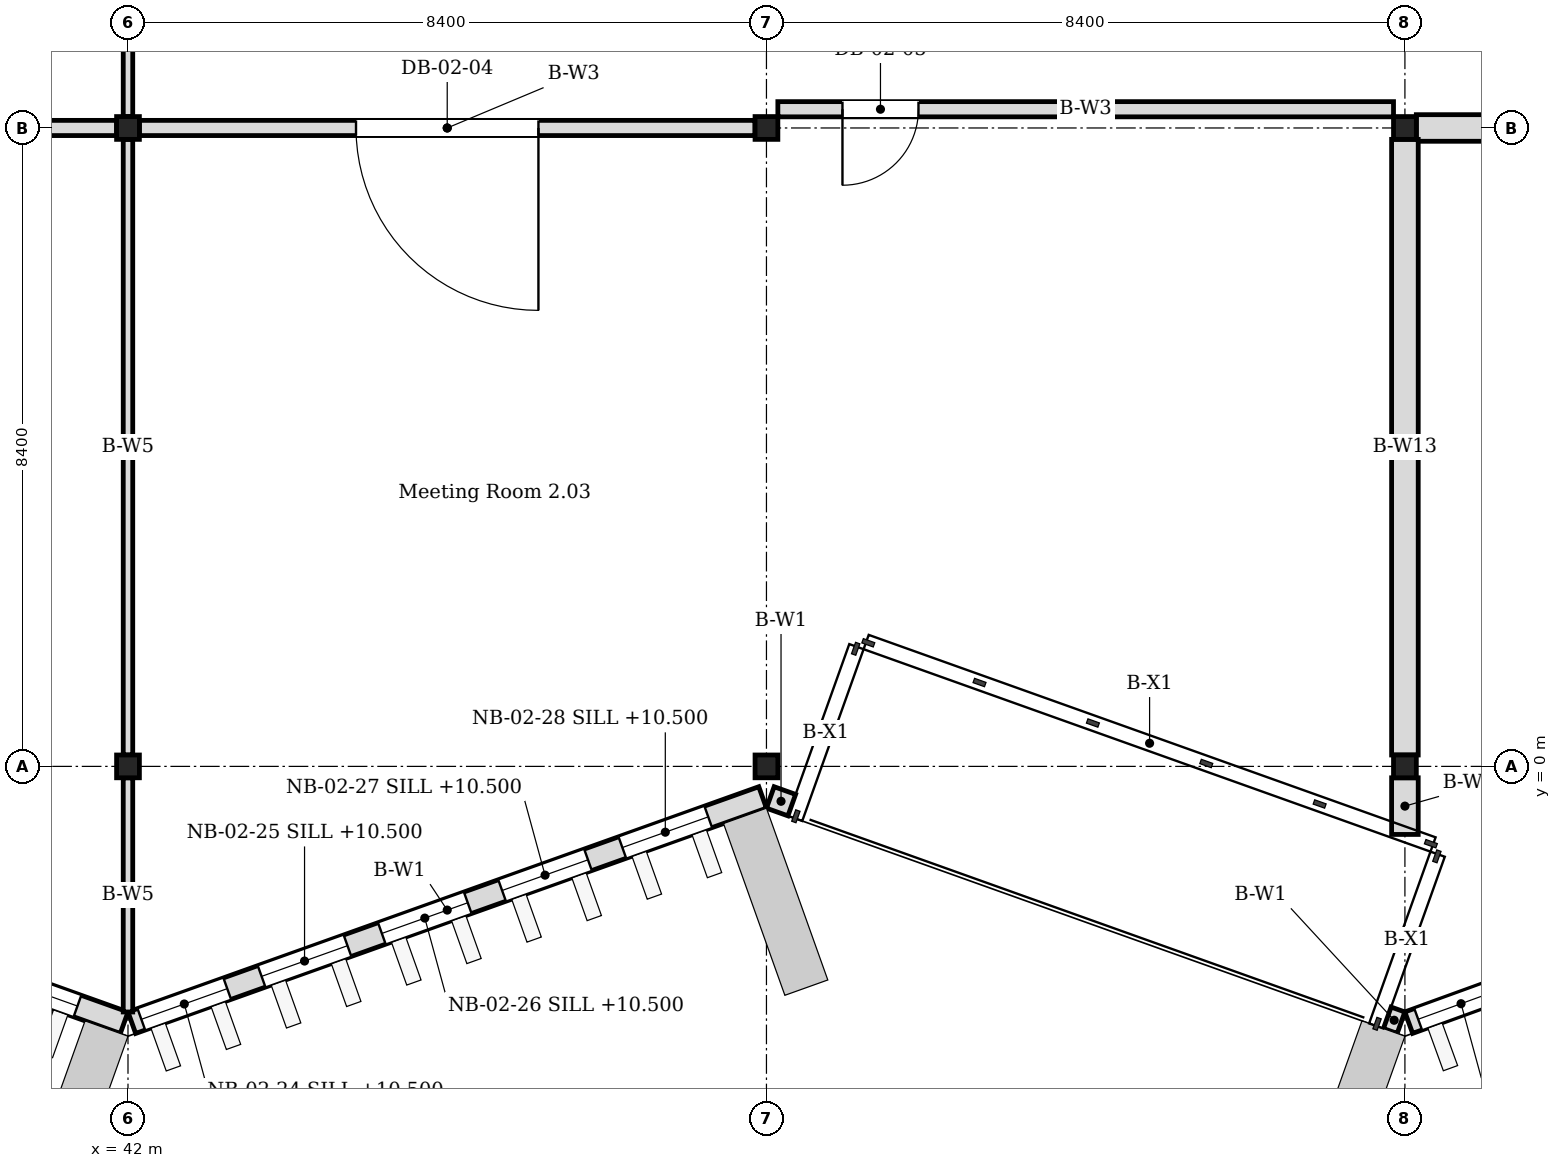
"""IFC4 building model, lengths in metres.
Left out: names, types, materials, properties, quantities, classifications, styles, units other than length and angle.
Written with IfcOpenShell. Run it as: python <this file> out.ifc"""

import sys

from ifc_helpers import new_model, si_unit, direction, frame, frame_2d, origin, origin_2d, place, context, subcontext, project, spatial, rectangle, i_section, extrude, element, fill, save


model = new_model("IFC4")
c1 = context("Model", 3, precision=1e-05, world=origin(), true_north=direction((0.0, 1.0)))
c2 = subcontext(c1, "Body", "Model", "MODEL_VIEW")
j1 = project(units=[si_unit("LENGTHUNIT", "METRE"), si_unit("PLANEANGLEUNIT", "RADIAN")], contexts=[c1])
p1 = place(None, origin())
s1 = spatial("IfcSite", under=j1, at=p1, CompositionType="ELEMENT")
p2 = place(p1, origin())
s2 = spatial("IfcBuilding", under=s1, at=p2, CompositionType="ELEMENT")
p3 = place(p2, frame((0.0, 0.0, 10.2)))
s3 = spatial("IfcBuildingStorey", under=s2, at=p3, CompositionType="ELEMENT", Elevation=10.2)
for number, where, z_axis, x_axis in (
    (1, (42.0, 0.0, 0.0), (0.0, 0.0, 1.0), (1.0, 0.0, 0.0)),
    (2, (42.0, 8.4, 0.0), (0.0, 0.0, 1.0), (1.0, 0.0, 0.0)),
    (3, (50.4, 0.0, 0.0), (0.0, 0.0, 1.0), (1.0, 0.0, 0.0)),
    (4, (50.4, 8.4, 0.0), (0.0, 0.0, 1.0), (1.0, 0.0, 0.0)),
    (5, (58.8, 0.0, 0.0), (0.0, 0.0, 1.0), (1.0, 0.0, 0.0)),
    (6, (58.8, 8.4, 0.0), (0.0, 0.0, 1.0), (1.0, 0.0, 0.0)),
):
    element("IfcColumn", number, at=place(p3, frame(where, z_axis=z_axis, x_axis=x_axis)), inside=s3, PredefinedType="COLUMN", context=c2, shape_type="SweptSolid", body=[
        extrude(i_section(OverallWidth=0.3, OverallDepth=0.3, WebThickness=0.01, FlangeThickness=0.015, FilletRadius=0.013, at=origin_2d()), origin(), (0.0, 0.0, 1.0), 4.2),
    ])
p4 = place(p3, frame((33.65, -0.409, 0.0), z_axis=(0.0, 0.0, 1.0), x_axis=(0.941736270411, -0.336352191894, 0.0)))
e7 = element("IfcWall", 7, at=p4, inside=s3, PredefinedType="SOLIDWALL", context=c2, shape_type="SweptSolid", body=[
    extrude(rectangle(XDim=8.812, YDim=0.3, at=frame_2d((4.406, 0.0))), origin(), (0.0, 0.0, 1.0), 4.05),
])
p5 = place(p4, frame((0.24, 0.0, 0.3)))
e8 = element("IfcOpeningElement", 8, at=p5, cuts=e7, PredefinedType="OPENING", context=c2, shape_type="SweptSolid", body=[
    extrude(rectangle(XDim=1.2, YDim=3.3, at=frame_2d((0.6, 1.65))), frame((0.0, 0.16, 0.0), z_axis=(0.0, -1.0, 0.0), x_axis=(1.0, 0.0, 0.0)), (0.0, 0.0, 1.0), 0.32),
])
p6 = place(p4, frame((1.92, 0.0, 0.3)))
e9 = element("IfcOpeningElement", 9, at=p6, cuts=e7, PredefinedType="OPENING", context=c2, shape_type="SweptSolid", body=[
    extrude(rectangle(XDim=1.2, YDim=3.3, at=frame_2d((0.6, 1.65))), frame((0.0, 0.16, 0.0), z_axis=(0.0, -1.0, 0.0), x_axis=(1.0, 0.0, 0.0)), (0.0, 0.0, 1.0), 0.32),
])
p7 = place(p4, frame((3.6, 0.0, 0.3)))
e10 = element("IfcOpeningElement", 10, at=p7, cuts=e7, PredefinedType="OPENING", context=c2, shape_type="SweptSolid", body=[
    extrude(rectangle(XDim=1.2, YDim=3.3, at=frame_2d((0.6, 1.65))), frame((0.0, 0.16, 0.0), z_axis=(0.0, -1.0, 0.0), x_axis=(1.0, 0.0, 0.0)), (0.0, 0.0, 1.0), 0.32),
])
p8 = place(p4, frame((5.28, 0.0, 0.3)))
e11 = element("IfcOpeningElement", 11, at=p8, cuts=e7, PredefinedType="OPENING", context=c2, shape_type="SweptSolid", body=[
    extrude(rectangle(XDim=1.2, YDim=3.3, at=frame_2d((0.6, 1.65))), frame((0.0, 0.16, 0.0), z_axis=(0.0, -1.0, 0.0), x_axis=(1.0, 0.0, 0.0)), (0.0, 0.0, 1.0), 0.32),
])
p9 = place(p4, frame((6.96, 0.0, 0.3)))
e12 = element("IfcOpeningElement", 12, at=p9, cuts=e7, PredefinedType="OPENING", context=c2, shape_type="SweptSolid", body=[
    extrude(rectangle(XDim=1.2, YDim=3.3, at=frame_2d((0.6, 1.65))), frame((0.0, 0.16, 0.0), z_axis=(0.0, -1.0, 0.0), x_axis=(1.0, 0.0, 0.0)), (0.0, 0.0, 1.0), 0.32),
])
p10 = place(p3, frame((42.051, -3.373, 0.0), z_axis=(0.0, 0.0, 1.0), x_axis=(0.941736270411, 0.336352191894, 0.0)))
e13 = element("IfcWall", 13, at=p10, inside=s3, PredefinedType="SOLIDWALL", context=c2, shape_type="SweptSolid", body=[
    extrude(rectangle(XDim=8.812, YDim=0.3, at=frame_2d((4.406, 0.0))), origin(), (0.0, 0.0, 1.0), 4.05),
])
p11 = place(p10, frame((0.133, 0.0, 0.3)))
e14 = element("IfcOpeningElement", 14, at=p11, cuts=e13, PredefinedType="OPENING", context=c2, shape_type="SweptSolid", body=[
    extrude(rectangle(XDim=1.2, YDim=3.3, at=frame_2d((0.6, 1.65))), frame((0.0, 0.16, 0.0), z_axis=(0.0, -1.0, 0.0), x_axis=(1.0, 0.0, 0.0)), (0.0, 0.0, 1.0), 0.32),
])
p12 = place(p10, frame((1.813, 0.0, 0.3)))
e15 = element("IfcOpeningElement", 15, at=p12, cuts=e13, PredefinedType="OPENING", context=c2, shape_type="SweptSolid", body=[
    extrude(rectangle(XDim=1.2, YDim=3.3, at=frame_2d((0.6, 1.65))), frame((0.0, 0.16, 0.0), z_axis=(0.0, -1.0, 0.0), x_axis=(1.0, 0.0, 0.0)), (0.0, 0.0, 1.0), 0.32),
])
p13 = place(p10, frame((3.493, 0.0, 0.3)))
e16 = element("IfcOpeningElement", 16, at=p13, cuts=e13, PredefinedType="OPENING", context=c2, shape_type="SweptSolid", body=[
    extrude(rectangle(XDim=1.2, YDim=3.3, at=frame_2d((0.6, 1.65))), frame((0.0, 0.16, 0.0), z_axis=(0.0, -1.0, 0.0), x_axis=(1.0, 0.0, 0.0)), (0.0, 0.0, 1.0), 0.32),
])
p14 = place(p10, frame((5.173, 0.0, 0.3)))
e17 = element("IfcOpeningElement", 17, at=p14, cuts=e13, PredefinedType="OPENING", context=c2, shape_type="SweptSolid", body=[
    extrude(rectangle(XDim=1.2, YDim=3.3, at=frame_2d((0.6, 1.65))), frame((0.0, 0.16, 0.0), z_axis=(0.0, -1.0, 0.0), x_axis=(1.0, 0.0, 0.0)), (0.0, 0.0, 1.0), 0.32),
])
p15 = place(p10, frame((6.853, 0.0, 0.3)))
e18 = element("IfcOpeningElement", 18, at=p15, cuts=e13, PredefinedType="OPENING", context=c2, shape_type="SweptSolid", body=[
    extrude(rectangle(XDim=1.2, YDim=3.3, at=frame_2d((0.6, 1.65))), frame((0.0, 0.16, 0.0), z_axis=(0.0, -1.0, 0.0), x_axis=(1.0, 0.0, 0.0)), (0.0, 0.0, 1.0), 0.32),
])
p16 = place(p3, frame((50.45, -0.409, 0.0), z_axis=(0.0, 0.0, 1.0), x_axis=(0.941797147708, -0.336181695768, 0.0)))
e19 = element("IfcWall", 19, at=p16, inside=s3, PredefinedType="SOLIDWALL", context=c2, shape_type="SweptSolid", body=[
    extrude(rectangle(XDim=0.3, YDim=0.3, at=frame_2d((0.15, 0.0))), origin(), (0.0, 0.0, 1.0), 4.05),
])
p17 = place(p3, frame((58.568, -3.308, 0.0), z_axis=(0.0, 0.0, 1.0), x_axis=(0.942000485661, -0.335611509061, 0.0)))
e20 = element("IfcWall", 20, at=p17, inside=s3, PredefinedType="SOLIDWALL", context=c2, shape_type="SweptSolid", body=[
    extrude(rectangle(XDim=0.192, YDim=0.3, at=frame_2d((0.096, 0.0))), origin(), (0.0, 0.0, 1.0), 4.05),
])
p18 = place(p3, frame((58.85, -3.372, 0.0), z_axis=(0.0, 0.0, 1.0), x_axis=(0.939953187971, 0.341303390584, 0.0)))
e21 = element("IfcWall", 21, at=p18, inside=s3, PredefinedType="SOLIDWALL", context=c2, shape_type="SweptSolid", body=[
    extrude(rectangle(XDim=8.828, YDim=0.3, at=frame_2d((4.414, 0.0))), origin(), (0.0, 0.0, 1.0), 4.05),
])
p19 = place(p18, frame((0.132, 0.0, 0.3)))
e22 = element("IfcOpeningElement", 22, at=p19, cuts=e21, PredefinedType="OPENING", context=c2, shape_type="SweptSolid", body=[
    extrude(rectangle(XDim=1.2, YDim=3.3, at=frame_2d((0.6, 1.65))), frame((0.0, 0.16, 0.0), z_axis=(0.0, -1.0, 0.0), x_axis=(1.0, 0.0, 0.0)), (0.0, 0.0, 1.0), 0.32),
])
p20 = place(p18, frame((1.812, 0.0, 0.3)))
e23 = element("IfcOpeningElement", 23, at=p20, cuts=e21, PredefinedType="OPENING", context=c2, shape_type="SweptSolid", body=[
    extrude(rectangle(XDim=1.2, YDim=3.3, at=frame_2d((0.6, 1.65))), frame((0.0, 0.16, 0.0), z_axis=(0.0, -1.0, 0.0), x_axis=(1.0, 0.0, 0.0)), (0.0, 0.0, 1.0), 0.32),
])
p21 = place(p18, frame((3.492, 0.0, 0.3)))
e24 = element("IfcOpeningElement", 24, at=p21, cuts=e21, PredefinedType="OPENING", context=c2, shape_type="SweptSolid", body=[
    extrude(rectangle(XDim=1.2, YDim=3.3, at=frame_2d((0.6, 1.65))), frame((0.0, 0.16, 0.0), z_axis=(0.0, -1.0, 0.0), x_axis=(1.0, 0.0, 0.0)), (0.0, 0.0, 1.0), 0.32),
])
p22 = place(p18, frame((5.172, 0.0, 0.3)))
e25 = element("IfcOpeningElement", 25, at=p22, cuts=e21, PredefinedType="OPENING", context=c2, shape_type="SweptSolid", body=[
    extrude(rectangle(XDim=1.2, YDim=3.3, at=frame_2d((0.6, 1.65))), frame((0.0, 0.16, 0.0), z_axis=(0.0, -1.0, 0.0), x_axis=(1.0, 0.0, 0.0)), (0.0, 0.0, 1.0), 0.32),
])
p23 = place(p18, frame((6.852, 0.0, 0.3)))
e26 = element("IfcOpeningElement", 26, at=p23, cuts=e21, PredefinedType="OPENING", context=c2, shape_type="SweptSolid", body=[
    extrude(rectangle(XDim=1.2, YDim=3.3, at=frame_2d((0.6, 1.65))), frame((0.0, 0.16, 0.0), z_axis=(0.0, -1.0, 0.0), x_axis=(1.0, 0.0, 0.0)), (0.0, 0.0, 1.0), 0.32),
])
p24 = place(p3, frame((33.75, 8.4, 0.0), z_axis=(0.0, 0.0, 1.0), x_axis=(1.0, 0.0, 0.0)))
e27 = element("IfcWall", 27, at=p24, inside=s3, PredefinedType="PARTITIONING", context=c2, shape_type="SweptSolid", body=[
    extrude(rectangle(XDim=8.1, YDim=0.2, at=frame_2d((4.05, 0.0))), origin(), (0.0, 0.0, 1.0), 3.35),
])
p25 = place(p24, frame((3.15, 0.0, 0.0)))
e28 = element("IfcOpeningElement", 28, at=p25, cuts=e27, PredefinedType="OPENING", context=c2, shape_type="SweptSolid", body=[
    extrude(rectangle(XDim=1.8, YDim=2.1, at=frame_2d((0.9, 1.05))), frame((0.0, 0.11, 0.0), z_axis=(0.0, -1.0, 0.0), x_axis=(1.0, 0.0, 0.0)), (0.0, 0.0, 1.0), 0.22),
])
p26 = place(p3, frame((42.15, 8.4, 0.0), z_axis=(0.0, 0.0, 1.0), x_axis=(1.0, 0.0, 0.0)))
e29 = element("IfcWall", 29, at=p26, inside=s3, PredefinedType="PARTITIONING", context=c2, shape_type="SweptSolid", body=[
    extrude(rectangle(XDim=8.1, YDim=0.2, at=frame_2d((4.05, 0.0))), origin(), (0.0, 0.0, 1.0), 3.35),
])
p27 = place(p26, frame((2.85, 0.0, 0.0)))
e30 = element("IfcOpeningElement", 30, at=p27, cuts=e29, PredefinedType="OPENING", context=c2, shape_type="SweptSolid", body=[
    extrude(rectangle(XDim=2.4, YDim=2.2, at=frame_2d((1.2, 1.1))), frame((0.0, 0.11, 0.0), z_axis=(0.0, -1.0, 0.0), x_axis=(1.0, 0.0, 0.0)), (0.0, 0.0, 1.0), 0.22),
])
p28 = place(p3, frame((50.55, 8.646, 0.0), z_axis=(0.0, 0.0, 1.0), x_axis=(1.0, 0.0, 0.0)))
e31 = element("IfcWall", 31, at=p28, inside=s3, PredefinedType="PARTITIONING", context=c2, shape_type="SweptSolid", body=[
    extrude(rectangle(XDim=8.1, YDim=0.2, at=frame_2d((4.05, 0.0))), origin(), (0.0, 0.0, 1.0), 3.35),
])
p29 = place(p28, frame((0.85, 0.0, 0.0)))
e32 = element("IfcOpeningElement", 32, at=p29, cuts=e31, PredefinedType="OPENING", context=c2, shape_type="SweptSolid", body=[
    extrude(rectangle(XDim=1.0, YDim=2.1, at=frame_2d((0.5, 1.05))), frame((0.0, 0.11, 0.0), z_axis=(0.0, -1.0, 0.0), x_axis=(1.0, 0.0, 0.0)), (0.0, 0.0, 1.0), 0.22),
])
p30 = place(p3, frame((58.95, 8.4, 0.0), z_axis=(0.0, 0.0, 1.0), x_axis=(1.0, 0.0, 0.0)))
e33 = element("IfcWall", 33, at=p30, inside=s3, PredefinedType="PARTITIONING", context=c2, shape_type="SweptSolid", body=[
    extrude(rectangle(XDim=8.1, YDim=0.35, at=frame_2d((4.05, 0.0))), origin(), (0.0, 0.0, 1.0), 3.35),
])
p31 = place(p30, frame((3.5, 0.0, 0.0)))
e34 = element("IfcOpeningElement", 34, at=p31, cuts=e33, PredefinedType="OPENING", context=c2, shape_type="SweptSolid", body=[
    extrude(rectangle(XDim=1.1, YDim=2.4, at=frame_2d((0.55, 1.2))), frame((0.0, 0.185, 0.0), z_axis=(0.0, -1.0, 0.0), x_axis=(1.0, 0.0, 0.0)), (0.0, 0.0, 1.0), 0.37),
])
p32 = place(p3, frame((42.0, -3.231, 0.0), z_axis=(0.0, 0.0, 1.0), x_axis=(0.0, 1.0, 0.0)))
e35 = element("IfcWall", 35, at=p32, inside=s3, PredefinedType="MOVABLE", context=c2, shape_type="SweptSolid", body=[
    extrude(rectangle(XDim=3.082, YDim=0.125, at=frame_2d((1.541, 0.0))), origin(), (0.0, 0.0, 1.0), 3.35),
])
p33 = place(p3, frame((42.0, 0.15, 0.0), z_axis=(0.0, 0.0, 1.0), x_axis=(0.0, 1.0, 0.0)))
e36 = element("IfcWall", 36, at=p33, inside=s3, PredefinedType="MOVABLE", context=c2, shape_type="SweptSolid", body=[
    extrude(rectangle(XDim=8.1, YDim=0.125, at=frame_2d((4.05, 0.0))), origin(), (0.0, 0.0, 1.0), 3.35),
])
p34 = place(p3, frame((42.0, 8.55, 0.0), z_axis=(0.0, 0.0, 1.0), x_axis=(0.0, 1.0, 0.0)))
e37 = element("IfcWall", 37, at=p34, inside=s3, PredefinedType="PARTITIONING", context=c2, shape_type="SweptSolid", body=[
    extrude(rectangle(XDim=8.1, YDim=0.125, at=frame_2d((4.05, 0.0))), origin(), (0.0, 0.0, 1.0), 3.35),
])
p35 = place(p34, frame((2.85, 0.0, 0.0)))
e38 = element("IfcOpeningElement", 38, at=p35, cuts=e37, PredefinedType="OPENING", context=c2, shape_type="SweptSolid", body=[
    extrude(rectangle(XDim=2.4, YDim=2.2, at=frame_2d((1.2, 1.1))), frame((0.0, 0.073, 0.0), z_axis=(0.0, -1.0, 0.0), x_axis=(1.0, 0.0, 0.0)), (0.0, 0.0, 1.0), 0.145),
])
p36 = place(p3, frame((58.8, -0.895, 0.0), z_axis=(0.0, 0.0, 1.0), x_axis=(0.0, 1.0, 0.0)))
e39 = element("IfcWall", 39, at=p36, inside=s3, PredefinedType="PARTITIONING", context=c2, shape_type="SweptSolid", body=[
    extrude(rectangle(XDim=0.745, YDim=0.35, at=frame_2d((0.373, 0.0))), origin(), (0.0, 0.0, 1.0), 3.35),
])
p37 = place(p3, frame((58.8, 0.15, 0.0), z_axis=(0.0, 0.0, 1.0), x_axis=(0.0, 1.0, 0.0)))
e40 = element("IfcWall", 40, at=p37, inside=s3, PredefinedType="PARTITIONING", context=c2, shape_type="SweptSolid", body=[
    extrude(rectangle(XDim=8.1, YDim=0.35, at=frame_2d((4.05, 0.0))), origin(), (0.0, 0.0, 1.0), 3.35),
])
p38 = place(p9, origin())
e41 = element("IfcWindow", 41, at=p38, inside=s3, PartitioningType="TRIPLE_PANEL_VERTICAL", PredefinedType="WINDOW", context=c2, shape_type="SweptSolid", body=[
    extrude(rectangle(XDim=1.2, YDim=3.3, at=frame_2d((0.6, 1.65))), frame((0.0, 0.03, 0.0), z_axis=(0.0, -1.0, 0.0), x_axis=(1.0, 0.0, 0.0)), (0.0, 0.0, 1.0), 0.06),
])
fill(e12, e41)
p39 = place(p11, origin())
e42 = element("IfcWindow", 42, at=p39, inside=s3, PartitioningType="TRIPLE_PANEL_VERTICAL", PredefinedType="WINDOW", context=c2, shape_type="SweptSolid", body=[
    extrude(rectangle(XDim=1.2, YDim=3.3, at=frame_2d((0.6, 1.65))), frame((0.0, 0.03, 0.0), z_axis=(0.0, -1.0, 0.0), x_axis=(1.0, 0.0, 0.0)), (0.0, 0.0, 1.0), 0.06),
])
fill(e14, e42)
p40 = place(p12, origin())
e43 = element("IfcWindow", 43, at=p40, inside=s3, PartitioningType="TRIPLE_PANEL_VERTICAL", PredefinedType="WINDOW", context=c2, shape_type="SweptSolid", body=[
    extrude(rectangle(XDim=1.2, YDim=3.3, at=frame_2d((0.6, 1.65))), frame((0.0, 0.03, 0.0), z_axis=(0.0, -1.0, 0.0), x_axis=(1.0, 0.0, 0.0)), (0.0, 0.0, 1.0), 0.06),
])
fill(e15, e43)
p41 = place(p13, origin())
e44 = element("IfcWindow", 44, at=p41, inside=s3, PartitioningType="TRIPLE_PANEL_VERTICAL", PredefinedType="WINDOW", context=c2, shape_type="SweptSolid", body=[
    extrude(rectangle(XDim=1.2, YDim=3.3, at=frame_2d((0.6, 1.65))), frame((0.0, 0.03, 0.0), z_axis=(0.0, -1.0, 0.0), x_axis=(1.0, 0.0, 0.0)), (0.0, 0.0, 1.0), 0.06),
])
fill(e16, e44)
p42 = place(p14, origin())
e45 = element("IfcWindow", 45, at=p42, inside=s3, PartitioningType="TRIPLE_PANEL_VERTICAL", PredefinedType="WINDOW", context=c2, shape_type="SweptSolid", body=[
    extrude(rectangle(XDim=1.2, YDim=3.3, at=frame_2d((0.6, 1.65))), frame((0.0, 0.03, 0.0), z_axis=(0.0, -1.0, 0.0), x_axis=(1.0, 0.0, 0.0)), (0.0, 0.0, 1.0), 0.06),
])
fill(e17, e45)
p43 = place(p15, origin())
e46 = element("IfcWindow", 46, at=p43, inside=s3, PartitioningType="TRIPLE_PANEL_VERTICAL", PredefinedType="WINDOW", context=c2, shape_type="SweptSolid", body=[
    extrude(rectangle(XDim=1.2, YDim=3.3, at=frame_2d((0.6, 1.65))), frame((0.0, 0.03, 0.0), z_axis=(0.0, -1.0, 0.0), x_axis=(1.0, 0.0, 0.0)), (0.0, 0.0, 1.0), 0.06),
])
fill(e18, e46)
p44 = place(p19, origin())
e47 = element("IfcWindow", 47, at=p44, inside=s3, PartitioningType="TRIPLE_PANEL_VERTICAL", PredefinedType="WINDOW", context=c2, shape_type="SweptSolid", body=[
    extrude(rectangle(XDim=1.2, YDim=3.3, at=frame_2d((0.6, 1.65))), frame((0.0, 0.03, 0.0), z_axis=(0.0, -1.0, 0.0), x_axis=(1.0, 0.0, 0.0)), (0.0, 0.0, 1.0), 0.06),
])
fill(e22, e47)
p45 = place(p27, origin())
e48 = element("IfcDoor", 48, at=p45, inside=s3, OperationType="DOUBLE_DOOR_SINGLE_SWING", PredefinedType="DOOR", context=c2, shape_type="SweptSolid", body=[
    extrude(rectangle(XDim=2.4, YDim=2.2, at=frame_2d((1.2, 1.1))), frame((0.0, 0.025, 0.0), z_axis=(0.0, -1.0, 0.0), x_axis=(1.0, 0.0, 0.0)), (0.0, 0.0, 1.0), 0.05),
])
fill(e30, e48)
p46 = place(p29, origin())
e49 = element("IfcDoor", 49, at=p46, inside=s3, OperationType="SINGLE_SWING_LEFT", PredefinedType="DOOR", context=c2, shape_type="SweptSolid", body=[
    extrude(rectangle(XDim=1.0, YDim=2.1, at=frame_2d((0.5, 1.05))), frame((0.0, 0.025, 0.0), z_axis=(0.0, -1.0, 0.0), x_axis=(1.0, 0.0, 0.0)), (0.0, 0.0, 1.0), 0.05),
])
fill(e32, e49)
save(model, sys.argv[1])
